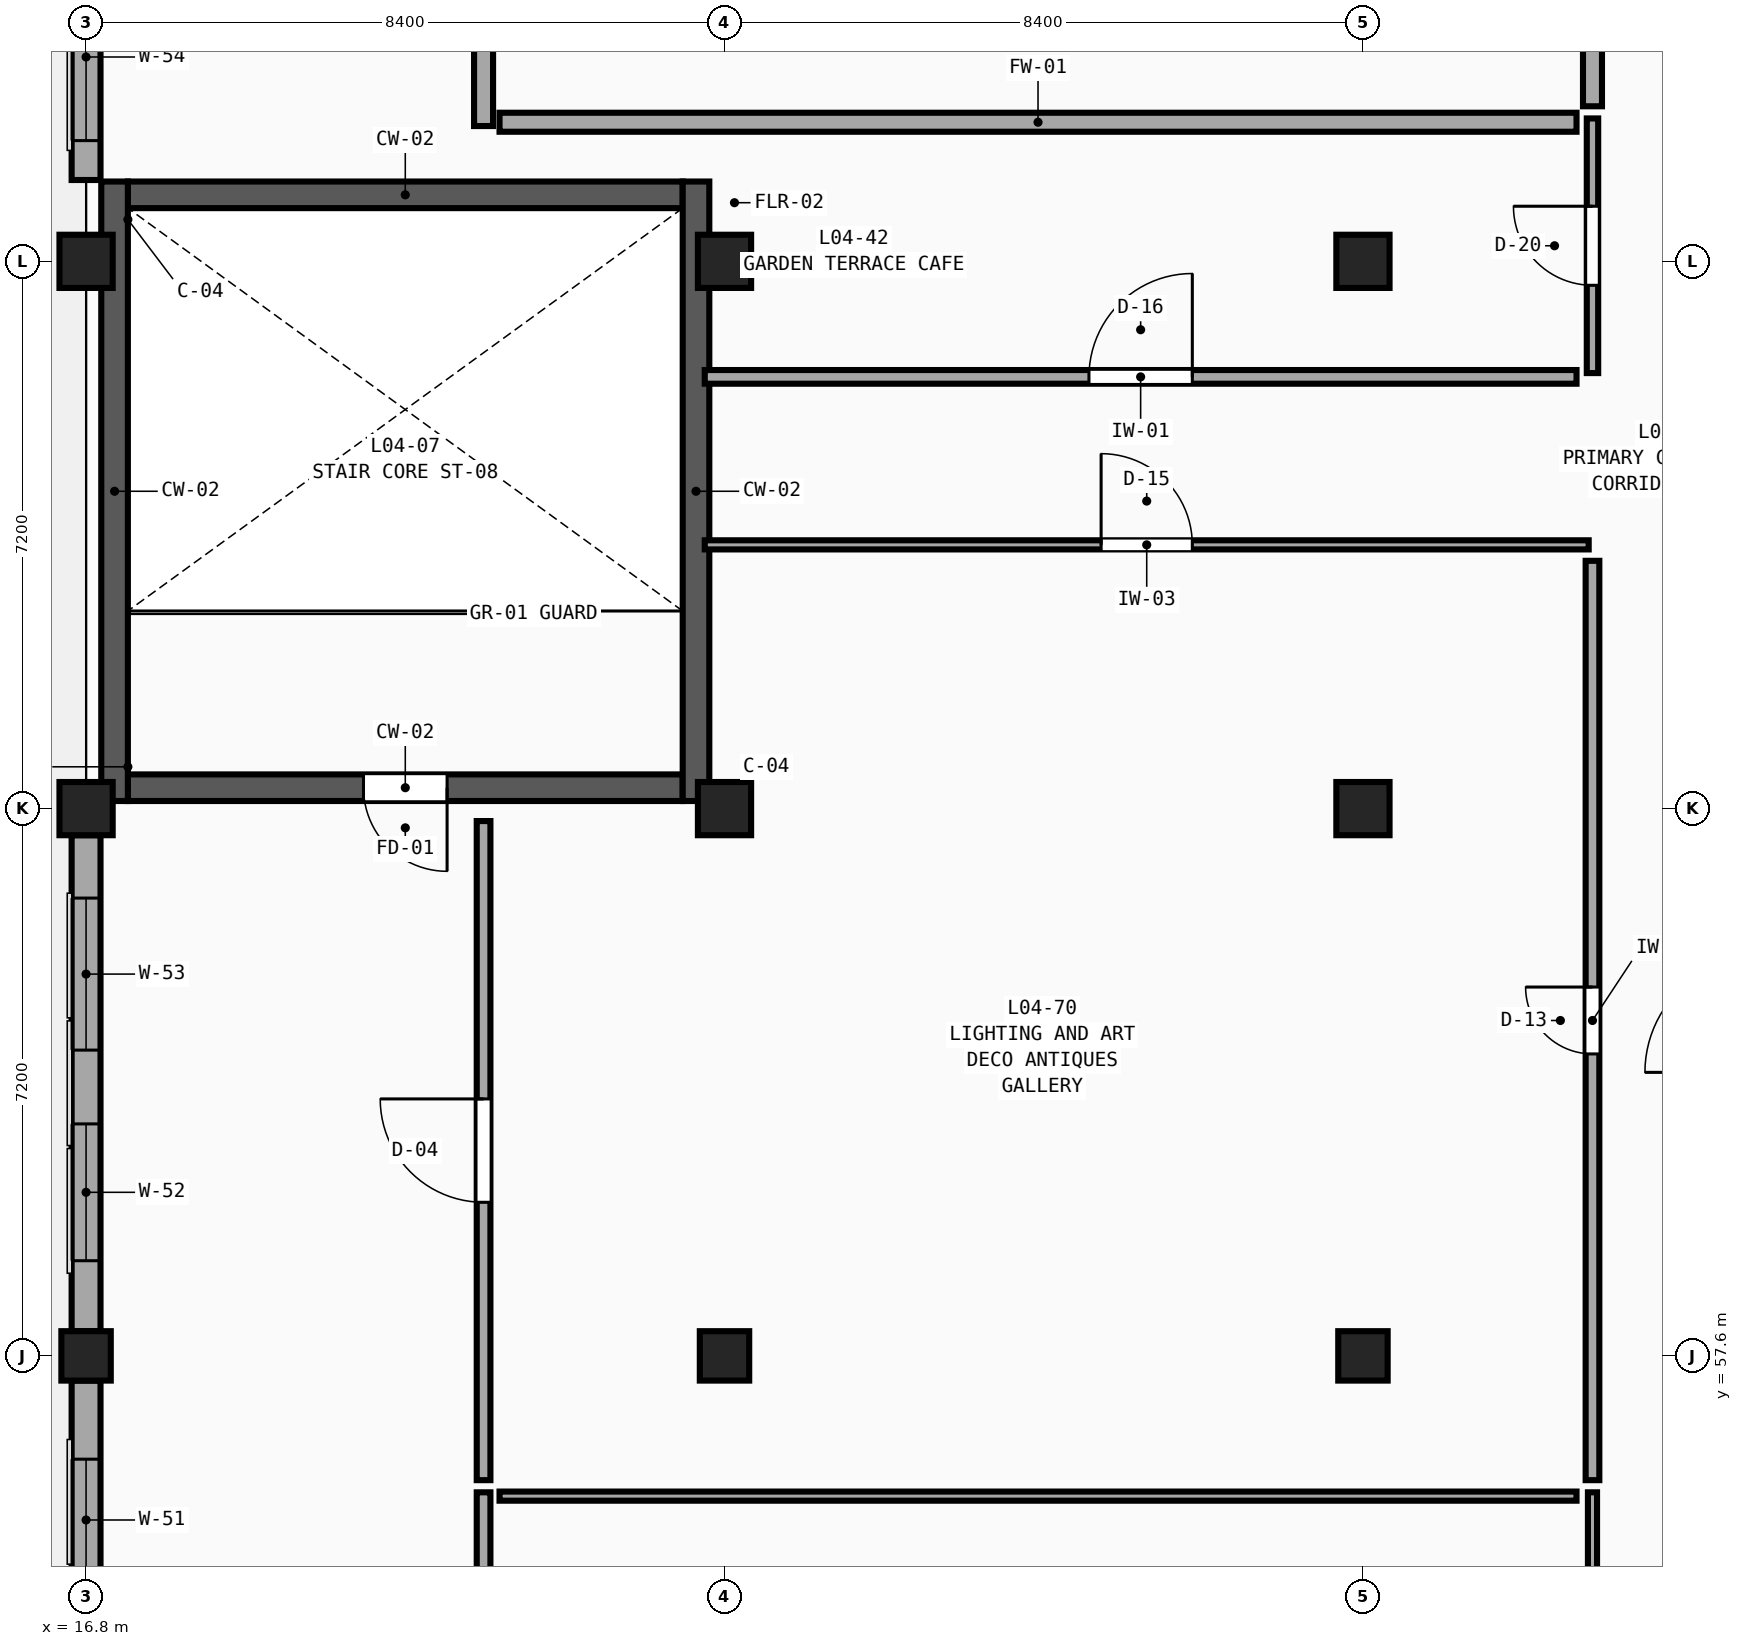
"""IFC4 building model, lengths in metres.
Left out: names, types, materials, properties, quantities, classifications, styles, units other than length and angle.
Written with IfcOpenShell. Run it as: python <this file> out.ifc"""

import sys

from ifc_helpers import new_model, si_unit, direction, frame, frame_2d, origin, origin_2d, place, context, subcontext, project, spatial, rectangle, extrude, element, fill, save


model = new_model("IFC4")
c1 = context("Model", 3, precision=1e-05, world=origin(), true_north=direction((0.0, 1.0)))
c2 = subcontext(c1, "Body", "Model", "MODEL_VIEW")
j1 = project(units=[si_unit("LENGTHUNIT", "METRE"), si_unit("PLANEANGLEUNIT", "RADIAN")], contexts=[c1])
p1 = place(None, origin())
s1 = spatial("IfcSite", under=j1, at=p1, CompositionType="ELEMENT")
p2 = place(p1, origin())
s2 = spatial("IfcBuilding", under=s1, at=p2, CompositionType="ELEMENT")
p3 = place(p2, frame((0.0, 0.0, 18.9)))
s3 = spatial("IfcBuildingStorey", under=s2, at=p3, CompositionType="ELEMENT", Elevation=18.9)
p4 = place(p3, frame((16.8, 57.6, 0.0), z_axis=(0.0, 0.0, 1.0), x_axis=(1.0, 0.0, 0.0)))
e1 = element("IfcColumn", 1, at=p4, inside=s3, PredefinedType="COLUMN", context=c2, shape_type="SweptSolid", body=[
    extrude(rectangle(XDim=0.65, YDim=0.65, at=origin_2d()), origin(), (0.0, 0.0, 1.0), 4.5),
])
for number, where, z_axis, x_axis in (
    (2, (16.8, 64.8, 0.0), (0.0, 0.0, 1.0), (1.0, 0.0, 0.0)),
    (3, (16.8, 72.0, 0.0), (0.0, 0.0, 1.0), (1.0, 0.0, 0.0)),
):
    element("IfcColumn", number, at=place(p3, frame(where, z_axis=z_axis, x_axis=x_axis)), inside=s3, PredefinedType="COLUMN", context=c2, shape_type="SweptSolid", body=[
        extrude(rectangle(XDim=0.7, YDim=0.7, at=origin_2d()), origin(), (0.0, 0.0, 1.0), 4.5),
    ])
p5 = place(p3, frame((25.2, 57.6, 0.0), z_axis=(0.0, 0.0, 1.0), x_axis=(1.0, 0.0, 0.0)))
e4 = element("IfcColumn", 4, at=p5, inside=s3, PredefinedType="COLUMN", context=c2, shape_type="SweptSolid", body=[
    extrude(rectangle(XDim=0.65, YDim=0.65, at=origin_2d()), origin(), (0.0, 0.0, 1.0), 4.5),
])
for number, where, z_axis, x_axis in (
    (5, (25.2, 64.8, 0.0), (0.0, 0.0, 1.0), (1.0, 0.0, 0.0)),
    (6, (25.2, 72.0, 0.0), (0.0, 0.0, 1.0), (1.0, 0.0, 0.0)),
):
    element("IfcColumn", number, at=place(p3, frame(where, z_axis=z_axis, x_axis=x_axis)), inside=s3, PredefinedType="COLUMN", context=c2, shape_type="SweptSolid", body=[
        extrude(rectangle(XDim=0.7, YDim=0.7, at=origin_2d()), origin(), (0.0, 0.0, 1.0), 4.5),
    ])
p6 = place(p3, frame((33.6, 57.6, 0.0), z_axis=(0.0, 0.0, 1.0), x_axis=(1.0, 0.0, 0.0)))
e7 = element("IfcColumn", 7, at=p6, inside=s3, PredefinedType="COLUMN", context=c2, shape_type="SweptSolid", body=[
    extrude(rectangle(XDim=0.65, YDim=0.65, at=origin_2d()), origin(), (0.0, 0.0, 1.0), 4.5),
])
for number, where, z_axis, x_axis in (
    (8, (33.6, 64.8, 0.0), (0.0, 0.0, 1.0), (1.0, 0.0, 0.0)),
    (9, (33.6, 72.0, 0.0), (0.0, 0.0, 1.0), (1.0, 0.0, 0.0)),
):
    element("IfcColumn", number, at=place(p3, frame(where, z_axis=z_axis, x_axis=x_axis)), inside=s3, PredefinedType="COLUMN", context=c2, shape_type="SweptSolid", body=[
        extrude(rectangle(XDim=0.7, YDim=0.7, at=origin_2d()), origin(), (0.0, 0.0, 1.0), 4.5),
    ])
p7 = place(p3, frame((16.8, 50.725, 0.0), z_axis=(0.0, 0.0, 1.0), x_axis=(0.0, 1.0, 0.0)))
e10 = element("IfcWall", 10, at=p7, inside=s3, PredefinedType="SOLIDWALL", context=c2, shape_type="SweptSolid", body=[
    extrude(rectangle(XDim=6.55, YDim=0.38, at=frame_2d((3.275, 0.0))), origin(), (0.0, 0.0, 1.0), 3.63),
])
p8 = place(p7, frame((1.134, 0.0, 0.75)))
e11 = element("IfcOpeningElement", 11, at=p8, cuts=e10, PredefinedType="OPENING", context=c2, shape_type="SweptSolid", body=[
    extrude(rectangle(XDim=1.4, YDim=2.73, at=frame_2d((0.7, 1.365))), frame((0.0, 0.21, 0.0), z_axis=(0.0, -1.0, 0.0), x_axis=(1.0, 0.0, 0.0)), (0.0, 0.0, 1.0), 0.42),
])
p9 = place(p7, frame((3.916, 0.0, 0.75)))
e12 = element("IfcOpeningElement", 12, at=p9, cuts=e10, PredefinedType="OPENING", context=c2, shape_type="SweptSolid", body=[
    extrude(rectangle(XDim=1.6, YDim=2.73, at=frame_2d((0.8, 1.365))), frame((0.0, 0.21, 0.0), z_axis=(0.0, -1.0, 0.0), x_axis=(1.0, 0.0, 0.0)), (0.0, 0.0, 1.0), 0.42),
])
p10 = place(p3, frame((16.8, 57.925, 0.0), z_axis=(0.0, 0.0, 1.0), x_axis=(0.0, 1.0, 0.0)))
e13 = element("IfcWall", 13, at=p10, inside=s3, PredefinedType="SOLIDWALL", context=c2, shape_type="SweptSolid", body=[
    extrude(rectangle(XDim=6.525, YDim=0.38, at=frame_2d((3.262, 0.0))), origin(), (0.0, 0.0, 1.0), 3.63),
])
p11 = place(p10, frame((0.927, 0.0, 0.75)))
e14 = element("IfcOpeningElement", 14, at=p11, cuts=e13, PredefinedType="OPENING", context=c2, shape_type="SweptSolid", body=[
    extrude(rectangle(XDim=1.8, YDim=2.73, at=frame_2d((0.9, 1.365))), frame((0.0, 0.21, 0.0), z_axis=(0.0, -1.0, 0.0), x_axis=(1.0, 0.0, 0.0)), (0.0, 0.0, 1.0), 0.42),
])
p12 = place(p10, frame((3.698, 0.0, 0.75)))
e15 = element("IfcOpeningElement", 15, at=p12, cuts=e13, PredefinedType="OPENING", context=c2, shape_type="SweptSolid", body=[
    extrude(rectangle(XDim=2.0, YDim=2.73, at=frame_2d((1.0, 1.365))), frame((0.0, 0.21, 0.0), z_axis=(0.0, -1.0, 0.0), x_axis=(1.0, 0.0, 0.0)), (0.0, 0.0, 1.0), 0.42),
])
p13 = place(p3, frame((16.8, 73.07, 0.0), z_axis=(0.0, 0.0, 1.0), x_axis=(0.0, 1.0, 0.0)))
e16 = element("IfcWall", 16, at=p13, inside=s3, PredefinedType="SOLIDWALL", context=c2, shape_type="SweptSolid", body=[
    extrude(rectangle(XDim=5.78, YDim=0.38, at=frame_2d((2.89, 0.0))), origin(), (0.0, 0.0, 1.0), 3.63),
])
p14 = place(p13, frame((0.518, 0.0, 0.75)))
e17 = element("IfcOpeningElement", 17, at=p14, cuts=e16, PredefinedType="OPENING", context=c2, shape_type="SweptSolid", body=[
    extrude(rectangle(XDim=2.2, YDim=2.73, at=frame_2d((1.1, 1.365))), frame((0.0, 0.21, 0.0), z_axis=(0.0, -1.0, 0.0), x_axis=(1.0, 0.0, 0.0)), (0.0, 0.0, 1.0), 0.42),
])
p15 = place(p13, frame((3.062, 0.0, 0.75)))
e18 = element("IfcOpeningElement", 18, at=p15, cuts=e16, PredefinedType="OPENING", context=c2, shape_type="SweptSolid", body=[
    extrude(rectangle(XDim=2.2, YDim=2.73, at=frame_2d((1.1, 1.365))), frame((0.0, 0.21, 0.0), z_axis=(0.0, -1.0, 0.0), x_axis=(1.0, 0.0, 0.0)), (0.0, 0.0, 1.0), 0.42),
])
p16 = place(p3, frame((24.65, 65.075, 0.0), z_axis=(0.0, 0.0, 1.0), x_axis=(-1.0, 0.0, 0.0)))
e19 = element("IfcWall", 19, at=p16, inside=s3, PredefinedType="SHEAR", context=c2, shape_type="SweptSolid", body=[
    extrude(rectangle(XDim=7.3, YDim=0.35, at=frame_2d((3.65, 0.0))), origin(), (0.0, 0.0, 1.0), 4.5),
])
p17 = place(p16, frame((3.1, 0.0, 0.0)))
e20 = element("IfcOpeningElement", 20, at=p17, cuts=e19, PredefinedType="OPENING", context=c2, shape_type="SweptSolid", body=[
    extrude(rectangle(XDim=1.1, YDim=2.2, at=frame_2d((0.55, 1.1))), frame((0.0, 0.195, 0.0), z_axis=(0.0, -1.0, 0.0), x_axis=(1.0, 0.0, 0.0)), (0.0, 0.0, 1.0), 0.39),
])
p18 = place(p3, frame((17.35, 72.875, 0.0), z_axis=(0.0, 0.0, 1.0), x_axis=(1.0, 0.0, 0.0)))
e21 = element("IfcWall", 21, at=p18, inside=s3, PredefinedType="SHEAR", context=c2, shape_type="SweptSolid", body=[
    extrude(rectangle(XDim=7.3, YDim=0.35, at=frame_2d((3.65, 0.0))), origin(), (0.0, 0.0, 1.0), 4.5),
])
for number, where, z_axis, x_axis in (
    (22, (17.175, 73.05, 0.0), (0.0, 0.0, 1.0), (0.0, -1.0, 0.0)),
    (23, (24.825, 64.9, 0.0), (0.0, 0.0, 1.0), (0.0, 1.0, 0.0)),
):
    element("IfcWall", number, at=place(p3, frame(where, z_axis=z_axis, x_axis=x_axis)), inside=s3, PredefinedType="SHEAR", context=c2, shape_type="SweptSolid", body=[
        extrude(rectangle(XDim=8.15, YDim=0.35, at=frame_2d((4.075, 0.0))), origin(), (0.0, 0.0, 1.0), 4.5),
    ])
p19 = place(p3, frame((36.62, 55.965, 0.0), z_axis=(0.0, 0.0, 1.0), x_axis=(0.0, 1.0, 0.0)))
e24 = element("IfcWall", 24, at=p19, inside=s3, PredefinedType="PARTITIONING", context=c2, shape_type="SweptSolid", body=[
    extrude(rectangle(XDim=12.095, YDim=0.18, at=frame_2d((6.047, 0.0))), origin(), (0.0, 0.0, 1.0), 4.18),
])
p20 = place(p19, frame((5.607, 0.0, 0.0)))
e25 = element("IfcOpeningElement", 25, at=p20, cuts=e24, PredefinedType="OPENING", context=c2, shape_type="SweptSolid", body=[
    extrude(rectangle(XDim=0.88, YDim=2.21, at=frame_2d((0.44, 1.105))), frame((0.0, 0.11, 0.0), z_axis=(0.0, -1.0, 0.0), x_axis=(1.0, 0.0, 0.0)), (0.0, 0.0, 1.0), 0.22),
])
p21 = place(p3, frame((24.94, 68.27, 0.0), z_axis=(0.0, 0.0, 1.0), x_axis=(1.0, 0.0, 0.0)))
e26 = element("IfcWall", 26, at=p21, inside=s3, PredefinedType="PARTITIONING", context=c2, shape_type="SweptSolid", body=[
    extrude(rectangle(XDim=11.63, YDim=0.12, at=frame_2d((5.815, 0.0))), origin(), (0.0, 0.0, 1.0), 4.18),
])
p22 = place(p21, frame((5.215, 0.0, 0.0)))
e27 = element("IfcOpeningElement", 27, at=p22, cuts=e26, PredefinedType="OPENING", context=c2, shape_type="SweptSolid", body=[
    extrude(rectangle(XDim=1.2, YDim=2.21, at=frame_2d((0.6, 1.105))), frame((0.0, 0.08, 0.0), z_axis=(0.0, -1.0, 0.0), x_axis=(1.0, 0.0, 0.0)), (0.0, 0.0, 1.0), 0.16),
])
p23 = place(p3, frame((24.94, 70.48, 0.0), z_axis=(0.0, 0.0, 1.0), x_axis=(1.0, 0.0, 0.0)))
e28 = element("IfcWall", 28, at=p23, inside=s3, PredefinedType="PARTITIONING", context=c2, shape_type="SweptSolid", body=[
    extrude(rectangle(XDim=11.47, YDim=0.18, at=frame_2d((5.735, 0.0))), origin(), (0.0, 0.0, 1.0), 4.18),
])
p24 = place(p23, frame((5.055, 0.0, 0.0)))
e29 = element("IfcOpeningElement", 29, at=p24, cuts=e28, PredefinedType="OPENING", context=c2, shape_type="SweptSolid", body=[
    extrude(rectangle(XDim=1.36, YDim=2.21, at=frame_2d((0.68, 1.105))), frame((0.0, 0.11, 0.0), z_axis=(0.0, -1.0, 0.0), x_axis=(1.0, 0.0, 0.0)), (0.0, 0.0, 1.0), 0.22),
])
p25 = place(p3, frame((22.03, 73.78, 0.0), z_axis=(0.0, 0.0, 1.0), x_axis=(0.0, 1.0, 0.0)))
e30 = element("IfcWall", 30, at=p25, inside=s3, PredefinedType="SOLIDWALL", context=c2, shape_type="SweptSolid", body=[
    extrude(rectangle(XDim=10.89, YDim=0.25, at=frame_2d((5.445, 0.0))), origin(), (0.0, 0.0, 1.0), 4.18),
])
p26 = place(p25, frame((4.545, 0.0, 0.0)))
e31 = element("IfcOpeningElement", 31, at=p26, cuts=e30, PredefinedType="OPENING", context=c2, shape_type="SweptSolid", body=[
    extrude(rectangle(XDim=1.8, YDim=2.3, at=frame_2d((0.9, 1.15))), frame((0.0, 0.145, 0.0), z_axis=(0.0, -1.0, 0.0), x_axis=(1.0, 0.0, 0.0)), (0.0, 0.0, 1.0), 0.29),
])
p27 = place(p3, frame((36.62, 74.04, 0.0), z_axis=(0.0, 0.0, 1.0), x_axis=(0.0, 1.0, 0.0)))
e32 = element("IfcWall", 32, at=p27, inside=s3, PredefinedType="SOLIDWALL", context=c2, shape_type="SweptSolid", body=[
    extrude(rectangle(XDim=10.63, YDim=0.25, at=frame_2d((5.315, 0.0))), origin(), (0.0, 0.0, 1.0), 4.18),
])
p28 = place(p27, frame((4.415, 0.0, 0.0)))
e33 = element("IfcOpeningElement", 33, at=p28, cuts=e32, PredefinedType="OPENING", context=c2, shape_type="SweptSolid", body=[
    extrude(rectangle(XDim=1.8, YDim=2.3, at=frame_2d((0.9, 1.15))), frame((0.0, 0.145, 0.0), z_axis=(0.0, -1.0, 0.0), x_axis=(1.0, 0.0, 0.0)), (0.0, 0.0, 1.0), 0.29),
])
p29 = place(p3, frame((36.62, 45.83, 0.0), z_axis=(0.0, 0.0, 1.0), x_axis=(0.0, 1.0, 0.0)))
e34 = element("IfcWall", 34, at=p29, inside=s3, PredefinedType="PARTITIONING", context=c2, shape_type="SweptSolid", body=[
    extrude(rectangle(XDim=9.975, YDim=0.12, at=frame_2d((4.987, 0.0))), origin(), (0.0, 0.0, 1.0), 4.18),
])
p30 = place(p29, frame((4.147, 0.0, 0.0)))
e35 = element("IfcOpeningElement", 35, at=p30, cuts=e34, PredefinedType="OPENING", context=c2, shape_type="SweptSolid", body=[
    extrude(rectangle(XDim=1.68, YDim=2.37, at=frame_2d((0.84, 1.185))), frame((0.0, 0.08, 0.0), z_axis=(0.0, -1.0, 0.0), x_axis=(1.0, 0.0, 0.0)), (0.0, 0.0, 1.0), 0.16),
])
p31 = place(p3, frame((22.03, 45.83, 0.0), z_axis=(0.0, 0.0, 1.0), x_axis=(0.0, 1.0, 0.0)))
e36 = element("IfcWall", 36, at=p31, inside=s3, PredefinedType="PARTITIONING", context=c2, shape_type="SweptSolid", body=[
    extrude(rectangle(XDim=9.975, YDim=0.18, at=frame_2d((4.987, 0.0))), origin(), (0.0, 0.0, 1.0), 4.18),
])
p32 = place(p31, frame((4.548, 0.0, 0.0)))
e37 = element("IfcOpeningElement", 37, at=p32, cuts=e36, PredefinedType="OPENING", context=c2, shape_type="SweptSolid", body=[
    extrude(rectangle(XDim=0.88, YDim=2.45, at=frame_2d((0.44, 1.225))), frame((0.0, 0.11, 0.0), z_axis=(0.0, -1.0, 0.0), x_axis=(1.0, 0.0, 0.0)), (0.0, 0.0, 1.0), 0.22),
])
p33 = place(p3, frame((22.03, 55.965, 0.0), z_axis=(0.0, 0.0, 1.0), x_axis=(0.0, 1.0, 0.0)))
e38 = element("IfcWall", 38, at=p33, inside=s3, PredefinedType="PARTITIONING", context=c2, shape_type="SweptSolid", body=[
    extrude(rectangle(XDim=8.671, YDim=0.18, at=frame_2d((4.336, 0.0))), origin(), (0.0, 0.0, 1.0), 4.18),
])
p34 = place(p33, frame((3.656, 0.0, 0.0)))
e39 = element("IfcOpeningElement", 39, at=p34, cuts=e38, PredefinedType="OPENING", context=c2, shape_type="SweptSolid", body=[
    extrude(rectangle(XDim=1.36, YDim=2.05, at=frame_2d((0.68, 1.025))), frame((0.0, 0.11, 0.0), z_axis=(0.0, -1.0, 0.0), x_axis=(1.0, 0.0, 0.0)), (0.0, 0.0, 1.0), 0.22),
])
p35 = place(p3, frame((36.62, 70.53, 0.0), z_axis=(0.0, 0.0, 1.0), x_axis=(0.0, 1.0, 0.0)))
e40 = element("IfcWall", 40, at=p35, inside=s3, PredefinedType="PARTITIONING", context=c2, shape_type="SweptSolid", body=[
    extrude(rectangle(XDim=3.35, YDim=0.15, at=frame_2d((1.675, 0.0))), origin(), (0.0, 0.0, 1.0), 4.18),
])
p36 = place(p35, frame((1.155, 0.0, 0.0)))
e41 = element("IfcOpeningElement", 41, at=p36, cuts=e40, PredefinedType="OPENING", context=c2, shape_type="SweptSolid", body=[
    extrude(rectangle(XDim=1.04, YDim=2.29, at=frame_2d((0.52, 1.145))), frame((0.0, 0.095, 0.0), z_axis=(0.0, -1.0, 0.0), x_axis=(1.0, 0.0, 0.0)), (0.0, 0.0, 1.0), 0.19),
])
p37 = place(p3, frame((22.24, 73.83, 0.0), z_axis=(0.0, 0.0, 1.0), x_axis=(1.0, 0.0, 0.0)))
e42 = element("IfcWall", 42, at=p37, inside=s3, PredefinedType="SOLIDWALL", context=c2, shape_type="SweptSolid", body=[
    extrude(rectangle(XDim=14.17, YDim=0.25, at=frame_2d((7.085, 0.0))), origin(), (0.0, 0.0, 1.0), 4.18),
])
p38 = place(p3, frame((22.24, 55.755, 0.0), z_axis=(0.0, 0.0, 1.0), x_axis=(1.0, 0.0, 0.0)))
e43 = element("IfcWall", 43, at=p38, inside=s3, PredefinedType="PARTITIONING", context=c2, shape_type="SweptSolid", body=[
    extrude(rectangle(XDim=14.17, YDim=0.12, at=frame_2d((7.085, 0.0))), origin(), (0.0, 0.0, 1.0), 4.18),
])
p39 = place(p9, origin())
e44 = element("IfcWindow", 44, at=p39, inside=s3, PartitioningType="DOUBLE_PANEL_VERTICAL", PredefinedType="WINDOW", context=c2, shape_type="SweptSolid", body=[
    extrude(rectangle(XDim=1.6, YDim=2.73, at=frame_2d((0.8, 1.365))), frame((0.0, 0.03, 0.0), z_axis=(0.0, -1.0, 0.0), x_axis=(1.0, 0.0, 0.0)), (0.0, 0.0, 1.0), 0.06),
])
fill(e12, e44)
p40 = place(p11, origin())
e45 = element("IfcWindow", 45, at=p40, inside=s3, PartitioningType="DOUBLE_PANEL_VERTICAL", PredefinedType="WINDOW", context=c2, shape_type="SweptSolid", body=[
    extrude(rectangle(XDim=1.8, YDim=2.73, at=frame_2d((0.9, 1.365))), frame((0.0, 0.03, 0.0), z_axis=(0.0, -1.0, 0.0), x_axis=(1.0, 0.0, 0.0)), (0.0, 0.0, 1.0), 0.06),
])
fill(e14, e45)
p41 = place(p12, origin())
e46 = element("IfcWindow", 46, at=p41, inside=s3, PartitioningType="TRIPLE_PANEL_VERTICAL", PredefinedType="WINDOW", context=c2, shape_type="SweptSolid", body=[
    extrude(rectangle(XDim=2.0, YDim=2.73, at=frame_2d((1.0, 1.365))), frame((0.0, 0.03, 0.0), z_axis=(0.0, -1.0, 0.0), x_axis=(1.0, 0.0, 0.0)), (0.0, 0.0, 1.0), 0.06),
])
fill(e15, e46)
p42 = place(p14, origin())
e47 = element("IfcWindow", 47, at=p42, inside=s3, PartitioningType="TRIPLE_PANEL_VERTICAL", PredefinedType="WINDOW", context=c2, shape_type="SweptSolid", body=[
    extrude(rectangle(XDim=2.2, YDim=2.73, at=frame_2d((1.1, 1.365))), frame((0.0, 0.03, 0.0), z_axis=(0.0, -1.0, 0.0), x_axis=(1.0, 0.0, 0.0)), (0.0, 0.0, 1.0), 0.06),
])
fill(e17, e47)
p43 = place(p17, origin())
e48 = element("IfcDoor", 48, at=p43, inside=s3, OperationType="SINGLE_SWING_LEFT", PredefinedType="DOOR", context=c2, shape_type="SweptSolid", body=[
    extrude(rectangle(XDim=1.1, YDim=2.2, at=frame_2d((0.55, 1.1))), frame((0.0, 0.025, 0.0), z_axis=(0.0, -1.0, 0.0), x_axis=(1.0, 0.0, 0.0)), (0.0, 0.0, 1.0), 0.05),
])
fill(e20, e48)
p44 = place(p20, origin())
e49 = element("IfcDoor", 49, at=p44, inside=s3, OperationType="SINGLE_SWING_RIGHT", PredefinedType="DOOR", context=c2, shape_type="SweptSolid", body=[
    extrude(rectangle(XDim=0.88, YDim=2.21, at=frame_2d((0.44, 1.105))), frame((0.0, 0.025, 0.0), z_axis=(0.0, -1.0, 0.0), x_axis=(1.0, 0.0, 0.0)), (0.0, 0.0, 1.0), 0.05),
])
fill(e25, e49)
p45 = place(p22, origin())
e50 = element("IfcDoor", 50, at=p45, inside=s3, OperationType="SINGLE_SWING_LEFT", PredefinedType="DOOR", context=c2, shape_type="SweptSolid", body=[
    extrude(rectangle(XDim=1.2, YDim=2.21, at=frame_2d((0.6, 1.105))), frame((0.0, 0.025, 0.0), z_axis=(0.0, -1.0, 0.0), x_axis=(1.0, 0.0, 0.0)), (0.0, 0.0, 1.0), 0.05),
])
fill(e27, e50)
p46 = place(p24, origin())
e51 = element("IfcDoor", 51, at=p46, inside=s3, OperationType="SINGLE_SWING_RIGHT", PredefinedType="DOOR", context=c2, shape_type="SweptSolid", body=[
    extrude(rectangle(XDim=1.36, YDim=2.21, at=frame_2d((0.68, 1.105))), frame((0.0, 0.025, 0.0), z_axis=(0.0, -1.0, 0.0), x_axis=(1.0, 0.0, 0.0)), (0.0, 0.0, 1.0), 0.05),
])
fill(e29, e51)
p47 = place(p34, origin())
e52 = element("IfcDoor", 52, at=p47, inside=s3, OperationType="SINGLE_SWING_RIGHT", PredefinedType="DOOR", context=c2, shape_type="SweptSolid", body=[
    extrude(rectangle(XDim=1.36, YDim=2.05, at=frame_2d((0.68, 1.025))), frame((0.0, 0.025, 0.0), z_axis=(0.0, -1.0, 0.0), x_axis=(1.0, 0.0, 0.0)), (0.0, 0.0, 1.0), 0.05),
])
fill(e39, e52)
p48 = place(p36, origin())
e53 = element("IfcDoor", 53, at=p48, inside=s3, OperationType="SINGLE_SWING_RIGHT", PredefinedType="DOOR", context=c2, shape_type="SweptSolid", body=[
    extrude(rectangle(XDim=1.04, YDim=2.29, at=frame_2d((0.52, 1.145))), frame((0.0, 0.025, 0.0), z_axis=(0.0, -1.0, 0.0), x_axis=(1.0, 0.0, 0.0)), (0.0, 0.0, 1.0), 0.05),
])
fill(e41, e53)
save(model, sys.argv[1])
